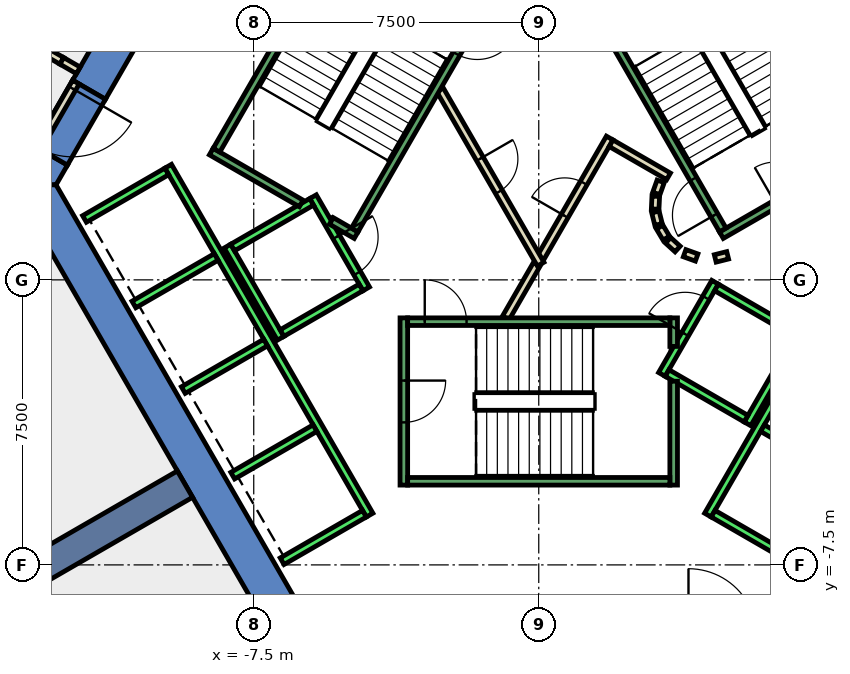
"""IFC4 building model, lengths in metres.
Left out: names, types, materials, properties, quantities, classifications, styles, units other than length and angle.
Written with IfcOpenShell. Run it as: python <this file> out.ifc"""

import sys

from ifc_helpers import new_model, si_unit, direction, frame, frame_2d, origin, place, context, subcontext, project, spatial, polyline, rectangle, outline, extrude, element, fill, save


model = new_model("IFC4")
c1 = context("Model", 3, precision=1e-05, world=origin(), true_north=direction((0.0, 1.0)))
c2 = subcontext(c1, "Body", "Model", "MODEL_VIEW")
j1 = project(units=[si_unit("LENGTHUNIT", "METRE"), si_unit("PLANEANGLEUNIT", "RADIAN")], contexts=[c1])
p1 = place(None, origin())
s1 = spatial("IfcSite", under=j1, at=p1, CompositionType="ELEMENT")
p2 = place(p1, origin())
s2 = spatial("IfcBuilding", under=s1, at=p2, CompositionType="ELEMENT")
p3 = place(p2, frame((0.0, 0.0, 176.0)))
s3 = spatial("IfcBuildingStorey", under=s2, at=p3, CompositionType="ELEMENT", Elevation=176.0)
p4 = place(p3, frame((0.0, 0.0, -0.4)))
e1 = element("IfcWall", 1, at=p4, inside=s3, PredefinedType="SHEAR", context=c2, shape_type="SweptSolid", body=[
    extrude(outline(polyline([(-12.267, 5.252), (-11.402, 4.752), (-6.351, 13.5), (-6.928, 14.5), (-12.267, 5.252)])), origin(), (0.0, 0.0, 1.0), 4.2),
])
p5 = place(p3, frame((0.0, 0.0, -0.4)))
e2 = element("IfcWall", 2, at=p5, inside=s3, PredefinedType="SHEAR", context=c2, shape_type="SweptSolid", body=[
    extrude(outline(polyline([(-12.402, 3.02), (-13.267, 3.52), (-13.856, 2.5), (-12.702, 2.5), (-12.402, 3.02)])), origin(), (0.0, 0.0, 1.0), 4.2),
])
p6 = place(p3, frame((0.0, 0.0, 3.6)))
e3 = element("IfcWall", 3, at=p6, inside=s3, PredefinedType="SHEAR", context=c2, shape_type="SweptSolid", body=[
    extrude(outline(polyline([(-13.267, 3.52), (-12.402, 3.02), (-11.402, 4.752), (-12.267, 5.252), (-13.267, 3.52)])), origin(), (0.0, 0.0, 1.0), 0.2),
])
p7 = place(p3, frame((0.0, 0.0, -0.4)))
e4 = element("IfcWall", 4, at=p7, inside=s3, PredefinedType="SHEAR", context=c2, shape_type="SweptSolid", body=[
    extrude(outline(polyline([(-13.856, 2.5), (-6.928, -9.5), (-6.351, -8.5), (-12.702, 2.5), (-13.856, 2.5)])), origin(), (0.0, 0.0, 1.0), 4.2),
])
p8 = place(p3, frame((-9.31, -5.375, -0.4), z_axis=(0.0, 0.0, 1.0), x_axis=(-0.866017533419, -0.500013631625, 0.0)))
e5 = element("IfcWall", 5, at=p8, inside=s3, PredefinedType="SHEAR", context=c2, shape_type="SweptSolid", body=[
    extrude(rectangle(XDim=9.0, YDim=0.8, at=frame_2d((4.5, 0.0))), origin(), (0.0, 0.0, 1.0), 4.2),
])
p9 = place(p3, frame((-14.966, 7.157, 0.0), z_axis=(0.0, 0.0, 1.0), x_axis=(0.86600487494, -0.500035555316, 0.0)))
e6 = element("IfcWall", 6, at=p9, inside=s3, PredefinedType="PARTITIONING", context=c2, shape_type="SweptSolid", body=[
    extrude(rectangle(XDim=2.79, YDim=0.2, at=frame_2d((1.395, 0.0))), origin(), (0.0, 0.0, 1.0), 3.75),
])
p10 = place(p3, frame((-0.866, -1.0, 0.0), z_axis=(0.0, 0.0, 1.0), x_axis=(0.500033287521, 0.866006184372, 0.0)))
e7 = element("IfcWall", 7, at=p10, inside=s3, PredefinedType="PARTITIONING", context=c2, shape_type="SweptSolid", body=[
    extrude(rectangle(XDim=1.632, YDim=0.2, at=frame_2d((0.816, 0.0))), origin(), (0.0, 0.0, 1.0), 3.75),
])
p11 = place(p3, frame((0.05, 0.587, 0.0), z_axis=(0.0, 0.0, 1.0), x_axis=(0.500028932171, 0.866008699143, 0.0)))
e8 = element("IfcWall", 8, at=p11, inside=s3, PredefinedType="PARTITIONING", context=c2, shape_type="SweptSolid", body=[
    extrude(rectangle(XDim=3.632, YDim=0.2, at=frame_2d((1.816, 0.0))), origin(), (0.0, 0.0, 1.0), 3.75),
])
p12 = place(p11, frame((1.266, 0.0, 0.0)))
e9 = element("IfcOpeningElement", 9, at=p12, cuts=e8, PredefinedType="OPENING", context=c2, shape_type="SweptSolid", body=[
    extrude(rectangle(XDim=1.0, YDim=2.1, at=frame_2d((0.5, 1.05))), frame((0.0, 0.11, 0.0), z_axis=(0.0, -1.0, 0.0), x_axis=(1.0, 0.0, 0.0)), (0.0, 0.0, 1.0), 0.22),
])
p13 = place(p3, frame((1.903, 3.595, 0.0), z_axis=(0.0, 0.0, 1.0), x_axis=(0.866239139897, -0.499629615326, 0.0)))
e10 = element("IfcWall", 10, at=p13, inside=s3, PredefinedType="PARTITIONING", context=c2, shape_type="SweptSolid", body=[
    extrude(rectangle(XDim=1.745, YDim=0.2, at=frame_2d((0.873, 0.0))), origin(), (0.0, 0.0, 1.0), 3.75),
])
p14 = place(p3, frame((3.208, 2.592, 0.0), z_axis=(0.0, 0.0, 1.0), x_axis=(-0.337388820924, -0.941365382578, 0.0)))
e11 = element("IfcWall", 11, at=p14, inside=s3, PredefinedType="PARTITIONING", context=c2, shape_type="SweptSolid", body=[
    extrude(rectangle(XDim=0.338, YDim=0.2, at=frame_2d((0.169, 0.0))), origin(), (0.0, 0.0, 1.0), 3.75),
])
p15 = place(p3, frame((3.079, 2.199, 0.0), z_axis=(0.0, 0.0, 1.0), x_axis=(-0.047771483479, -0.998858290933, 0.0)))
e12 = element("IfcWall", 12, at=p15, inside=s3, PredefinedType="PARTITIONING", context=c2, shape_type="SweptSolid", body=[
    extrude(rectangle(XDim=0.337, YDim=0.2, at=frame_2d((0.169, 0.0))), origin(), (0.0, 0.0, 1.0), 3.75),
])
p16 = place(p3, frame((3.07, 1.786, 0.0), z_axis=(0.0, 0.0, 1.0), x_axis=(0.242705583207, -0.970099994784, 0.0)))
e13 = element("IfcWall", 13, at=p16, inside=s3, PredefinedType="PARTITIONING", context=c2, shape_type="SweptSolid", body=[
    extrude(rectangle(XDim=0.338, YDim=0.2, at=frame_2d((0.169, 0.0))), origin(), (0.0, 0.0, 1.0), 3.75),
])
for number, where, z_axis, x_axis in (
    (14, (3.182, 1.388, 0.0), (0.0, 0.0, 1.0), (0.512, -0.859, 0.0)),
    (15, (3.404, 1.039, 0.0), (0.0, 0.0, 1.0), (0.74, -0.672, 0.0)),
):
    element("IfcWall", number, at=place(p3, frame(where, z_axis=z_axis, x_axis=x_axis)), inside=s3, PredefinedType="PARTITIONING", context=c2, shape_type="SweptSolid", body=[
        extrude(rectangle(XDim=0.338, YDim=0.2, at=frame_2d((0.169, 0.0))), origin(), (0.0, 0.0, 1.0), 3.75),
    ])
p17 = place(p3, frame((3.838, 0.702, 0.0), z_axis=(0.0, 0.0, 1.0), x_axis=(0.941035081519, -0.338308993895, 0.0)))
e16 = element("IfcWall", 16, at=p17, inside=s3, PredefinedType="PARTITIONING", context=c2, shape_type="SweptSolid", body=[
    extrude(rectangle(XDim=0.337, YDim=0.2, at=frame_2d((0.168, 0.0))), origin(), (0.0, 0.0, 1.0), 3.75),
])
p18 = place(p3, frame((4.644, 0.564, 0.0), z_axis=(0.0, 0.0, 1.0), x_axis=(0.969929076366, 0.243387729394, 0.0)))
e17 = element("IfcWall", 17, at=p18, inside=s3, PredefinedType="PARTITIONING", context=c2, shape_type="SweptSolid", body=[
    extrude(rectangle(XDim=0.337, YDim=0.2, at=frame_2d((0.168, 0.0))), origin(), (0.0, 0.0, 1.0), 3.75),
])
p19 = place(p3, frame((-2.598, 5.0, 0.0), z_axis=(0.0, 0.0, 1.0), x_axis=(0.49995654735, -0.86605048973, 0.0)))
e18 = element("IfcWall", 18, at=p19, inside=s3, PredefinedType="PARTITIONING", context=c2, shape_type="SweptSolid", body=[
    extrude(rectangle(XDim=5.296, YDim=0.2, at=frame_2d((2.648, 0.0))), origin(), (0.0, 0.0, 1.0), 3.75),
])
p20 = place(p19, frame((2.098, 0.0, 0.0)))
e19 = element("IfcOpeningElement", 19, at=p20, cuts=e18, PredefinedType="OPENING", context=c2, shape_type="SweptSolid", body=[
    extrude(rectangle(XDim=1.0, YDim=2.1, at=frame_2d((0.5, 1.05))), frame((0.0, 0.11, 0.0), z_axis=(0.0, -1.0, 0.0), x_axis=(1.0, 0.0, 0.0)), (0.0, 0.0, 1.0), 0.22),
])
p21 = place(p3, frame((-12.18, 5.202, 0.0), z_axis=(0.0, 0.0, 1.0), x_axis=(-0.50002537861, -0.866010750942, 0.0)))
e20 = element("IfcWall", 20, at=p21, inside=s3, PredefinedType="PARTITIONING", context=c2, shape_type="SweptSolid", body=[
    extrude(rectangle(XDim=2.0, YDim=0.2, at=frame_2d((1.0, 0.0))), origin(), (0.0, 0.0, 1.0), 2.4),
])
p22 = place(p21, frame((0.19, 0.0, 0.0)))
e21 = element("IfcOpeningElement", 21, at=p22, cuts=e20, PredefinedType="OPENING", context=c2, shape_type="SweptSolid", body=[
    extrude(rectangle(XDim=1.8, YDim=2.1, at=frame_2d((0.9, 1.05))), frame((0.0, 0.11, 0.0), z_axis=(0.0, -1.0, 0.0), x_axis=(1.0, 0.0, 0.0)), (0.0, 0.0, 1.0), 0.22),
])
p23 = place(p3, frame((-12.55, 5.762, 0.0), z_axis=(0.0, 0.0, 1.0), x_axis=(0.866071776036, -0.499919672301, 0.0)))
e22 = element("IfcWall", 22, at=p23, inside=s3, PredefinedType="PARTITIONING", context=c2, shape_type="SweptSolid", body=[
    extrude(rectangle(XDim=0.5, YDim=0.2, at=frame_2d((0.25, 0.0))), origin(), (0.0, 0.0, 1.0), 2.4),
])
p24 = place(p3, frame((-5.94, 2.188, 0.0), z_axis=(0.0, 0.0, 1.0), x_axis=(0.49994636267, -0.866056369097, 0.0)))
e23 = element("IfcWall", 23, at=p24, inside=s3, PredefinedType="STANDARD", context=c2, shape_type="SweptSolid", body=[
    extrude(rectangle(XDim=2.8, YDim=0.2, at=frame_2d((1.4, 0.0))), origin(), (0.0, 0.0, 1.0), 3.75),
])
p25 = place(p24, frame((1.225, 0.0, 0.0)))
e24 = element("IfcOpeningElement", 24, at=p25, cuts=e23, PredefinedType="OPENING", context=c2, shape_type="SweptSolid", body=[
    extrude(rectangle(XDim=1.1, YDim=2.1, at=frame_2d((0.55, 1.05))), frame((0.0, 0.11, 0.0), z_axis=(0.0, -1.0, 0.0), x_axis=(1.0, 0.0, 0.0)), (0.0, 0.0, 1.0), 0.22),
])
p26 = place(p3, frame((-8.192, 0.888, 0.0), z_axis=(0.0, 0.0, 1.0), x_axis=(0.49994636267, -0.866056369097, 0.0)))
e25 = element("IfcWall", 25, at=p26, inside=s3, PredefinedType="STANDARD", context=c2, shape_type="SweptSolid", body=[
    extrude(rectangle(XDim=2.8, YDim=0.2, at=frame_2d((1.4, 0.0))), origin(), (0.0, 0.0, 1.0), 3.75),
])
for number, where, z_axis, x_axis in (
    (26, (-5.977, 2.052, 0.0), (0.0, 0.0, 1.0), (-0.866, -0.5, 0.0)),
    (27, (-4.677, -0.2, 0.0), (0.0, 0.0, 1.0), (-0.866, -0.5, 0.0)),
):
    element("IfcWall", number, at=place(p3, frame(where, z_axis=z_axis, x_axis=x_axis)), inside=s3, PredefinedType="STANDARD", context=c2, shape_type="SweptSolid", body=[
        extrude(rectangle(XDim=2.399, YDim=0.2, at=frame_2d((1.2, 0.0))), origin(), (0.0, 0.0, 1.0), 3.75),
    ])
p27 = place(p3, frame((-9.751, 2.99, 0.0), z_axis=(0.0, 0.0, 1.0), x_axis=(0.50000090737, -0.866024879913, 0.0)))
e28 = element("IfcWall", 28, at=p27, inside=s3, PredefinedType="STANDARD", context=c2, shape_type="SweptSolid", body=[
    extrude(rectangle(XDim=10.6, YDim=0.2, at=frame_2d((5.3, 0.0))), origin(), (0.0, 0.0, 1.0), 3.75),
])
p28 = place(p3, frame((-9.788, 2.853, 0.0), z_axis=(0.0, 0.0, 1.0), x_axis=(-0.865998541277, -0.500046524342, 0.0)))
e29 = element("IfcWall", 29, at=p28, inside=s3, PredefinedType="STANDARD", context=c2, shape_type="SweptSolid", body=[
    extrude(rectangle(XDim=2.5, YDim=0.2, at=frame_2d((1.25, 0.0))), origin(), (0.0, 0.0, 1.0), 3.75),
])
for number, where, z_axis, x_axis in (
    (30, (-8.488, 0.602, 0.0), (0.0, 0.0, 1.0), (-0.866, -0.5, 0.0)),
    (31, (-7.188, -1.65, 0.0), (0.0, 0.0, 1.0), (-0.866, -0.5, 0.0)),
    (32, (-5.888, -3.902, 0.0), (0.0, 0.0, 1.0), (-0.866, -0.5, 0.0)),
    (33, (-4.588, -6.153, 0.0), (0.0, 0.0, 1.0), (-0.866, -0.5, 0.0)),
):
    element("IfcWall", number, at=place(p3, frame(where, z_axis=z_axis, x_axis=x_axis)), inside=s3, PredefinedType="STANDARD", context=c2, shape_type="SweptSolid", body=[
        extrude(rectangle(XDim=2.5, YDim=0.2, at=frame_2d((1.25, 0.0))), origin(), (0.0, 0.0, 1.0), 3.75),
    ])
p29 = place(p3, frame((3.24, -2.488, 0.0), z_axis=(0.0, 0.0, 1.0), x_axis=(0.49994636267, 0.866056369097, 0.0)))
e34 = element("IfcWall", 34, at=p29, inside=s3, PredefinedType="STANDARD", context=c2, shape_type="SweptSolid", body=[
    extrude(rectangle(XDim=2.8, YDim=0.2, at=frame_2d((1.4, 0.0))), origin(), (0.0, 0.0, 1.0), 3.75),
])
p30 = place(p29, frame((1.225, 0.0, 0.0)))
e35 = element("IfcOpeningElement", 35, at=p30, cuts=e34, PredefinedType="OPENING", context=c2, shape_type="SweptSolid", body=[
    extrude(rectangle(XDim=1.1, YDim=2.1, at=frame_2d((0.55, 1.05))), frame((0.0, 0.11, 0.0), z_axis=(0.0, -1.0, 0.0), x_axis=(1.0, 0.0, 0.0)), (0.0, 0.0, 1.0), 0.22),
])
p31 = place(p3, frame((5.492, -3.788, 0.0), z_axis=(0.0, 0.0, 1.0), x_axis=(0.500011755427, 0.866018616679, 0.0)))
e36 = element("IfcWall", 36, at=p31, inside=s3, PredefinedType="STANDARD", context=c2, shape_type="SweptSolid", body=[
    extrude(rectangle(XDim=2.8, YDim=0.2, at=frame_2d((1.4, 0.0))), origin(), (0.0, 0.0, 1.0), 3.75),
])
p32 = place(p3, frame((3.377, -2.452, 0.0), z_axis=(0.0, 0.0, 1.0), x_axis=(0.865955154139, -0.50012165622, 0.0)))
e37 = element("IfcWall", 37, at=p32, inside=s3, PredefinedType="STANDARD", context=c2, shape_type="SweptSolid", body=[
    extrude(rectangle(XDim=2.4, YDim=0.2, at=frame_2d((1.2, 0.0))), origin(), (0.0, 0.0, 1.0), 3.75),
])
p33 = place(p3, frame((4.677, -0.2, 0.0), z_axis=(0.0, 0.0, 1.0), x_axis=(0.865973769406, -0.500089422704, 0.0)))
e38 = element("IfcWall", 38, at=p33, inside=s3, PredefinedType="STANDARD", context=c2, shape_type="SweptSolid", body=[
    extrude(rectangle(XDim=2.399, YDim=0.2, at=frame_2d((1.2, 0.0))), origin(), (0.0, 0.0, 1.0), 3.75),
])
p34 = place(p3, frame((4.451, -6.19, 0.0), z_axis=(0.0, 0.0, 1.0), x_axis=(0.50000090737, 0.866024879913, 0.0)))
e39 = element("IfcWall", 39, at=p34, inside=s3, PredefinedType="STANDARD", context=c2, shape_type="SweptSolid", body=[
    extrude(rectangle(XDim=10.6, YDim=0.2, at=frame_2d((5.3, 0.0))), origin(), (0.0, 0.0, 1.0), 3.75),
])
for number, where, z_axis, x_axis in (
    (40, (4.588, -6.153, 0.0), (0.0, 0.0, 1.0), (0.866, -0.5, 0.0)),
    (41, (5.888, -3.902, 0.0), (0.0, 0.0, 1.0), (0.866, -0.5, 0.0)),
):
    element("IfcWall", number, at=place(p3, frame(where, z_axis=z_axis, x_axis=x_axis)), inside=s3, PredefinedType="STANDARD", context=c2, shape_type="SweptSolid", body=[
        extrude(rectangle(XDim=2.5, YDim=0.2, at=frame_2d((1.25, 0.0))), origin(), (0.0, 0.0, 1.0), 3.75),
    ])
p35 = place(p3, frame((-3.55, -1.0, 0.0), z_axis=(0.0, 0.0, 1.0), x_axis=(0.0, -1.0, 0.0)))
e42 = element("IfcWall", 42, at=p35, inside=s3, PredefinedType="STANDARD", context=c2, shape_type="SweptSolid", body=[
    extrude(rectangle(XDim=4.4, YDim=0.2, at=frame_2d((2.2, 0.0))), origin(), (0.0, 0.0, 1.0), 3.75),
])
p36 = place(p35, frame((1.65, 0.0, 0.0)))
e43 = element("IfcOpeningElement", 43, at=p36, cuts=e42, PredefinedType="OPENING", context=c2, shape_type="SweptSolid", body=[
    extrude(rectangle(XDim=1.1, YDim=2.2, at=frame_2d((0.55, 1.1))), frame((0.0, 0.11, 0.0), z_axis=(0.0, -1.0, 0.0), x_axis=(1.0, 0.0, 0.0)), (0.0, 0.0, 1.0), 0.22),
])
p37 = place(p3, frame((3.55, -2.667, 0.0), z_axis=(0.0, 0.0, 1.0), x_axis=(0.0, -1.0, 0.0)))
e44 = element("IfcWall", 44, at=p37, inside=s3, PredefinedType="STANDARD", context=c2, shape_type="SweptSolid", body=[
    extrude(rectangle(XDim=2.733, YDim=0.2, at=frame_2d((1.366, 0.0))), origin(), (0.0, 0.0, 1.0), 3.75),
])
p38 = place(p3, frame((3.55, -1.0, 0.0), z_axis=(0.0, 0.0, 1.0), x_axis=(0.0, -1.0, 0.0)))
e45 = element("IfcWall", 45, at=p38, inside=s3, PredefinedType="STANDARD", context=c2, shape_type="SweptSolid", body=[
    extrude(rectangle(XDim=0.751, YDim=0.2, at=frame_2d((0.375, 0.0))), origin(), (0.0, 0.0, 1.0), 3.75),
])
p39 = place(p3, frame((-3.45, -1.1, 0.0), z_axis=(0.0, 0.0, 1.0), x_axis=(1.0, 0.0, 0.0)))
e46 = element("IfcWall", 46, at=p39, inside=s3, PredefinedType="STANDARD", context=c2, shape_type="SweptSolid", body=[
    extrude(rectangle(XDim=6.9, YDim=0.2, at=frame_2d((3.45, 0.0))), origin(), (0.0, 0.0, 1.0), 3.75),
])
p40 = place(p39, frame((0.45, 0.0, 0.0)))
e47 = element("IfcOpeningElement", 47, at=p40, cuts=e46, PredefinedType="OPENING", context=c2, shape_type="SweptSolid", body=[
    extrude(rectangle(XDim=1.1, YDim=2.2, at=frame_2d((0.55, 1.1))), frame((0.0, 0.11, 0.0), z_axis=(0.0, -1.0, 0.0), x_axis=(1.0, 0.0, 0.0)), (0.0, 0.0, 1.0), 0.22),
])
p41 = place(p3, frame((-3.45, -5.3, 0.0), z_axis=(0.0, 0.0, 1.0), x_axis=(1.0, 0.0, 0.0)))
e48 = element("IfcWall", 48, at=p41, inside=s3, PredefinedType="STANDARD", context=c2, shape_type="SweptSolid", body=[
    extrude(rectangle(XDim=6.9, YDim=0.2, at=frame_2d((3.45, 0.0))), origin(), (0.0, 0.0, 1.0), 3.75),
])
p42 = place(p3, frame((4.806, 1.176, 0.0), z_axis=(0.0, 0.0, 1.0), x_axis=(0.866059941101, 0.499940174841, 0.0)))
e49 = element("IfcWall", 49, at=p42, inside=s3, PredefinedType="STANDARD", context=c2, shape_type="SweptSolid", body=[
    extrude(rectangle(XDim=4.4, YDim=0.2, at=frame_2d((2.2, 0.0))), origin(), (0.0, 0.0, 1.0), 3.75),
])
p43 = place(p42, frame((1.65, 0.0, 0.0)))
e50 = element("IfcOpeningElement", 50, at=p43, cuts=e49, PredefinedType="OPENING", context=c2, shape_type="SweptSolid", body=[
    extrude(rectangle(XDim=1.1, YDim=2.2, at=frame_2d((0.55, 1.1))), frame((0.0, 0.11, 0.0), z_axis=(0.0, -1.0, 0.0), x_axis=(1.0, 0.0, 0.0)), (0.0, 0.0, 1.0), 0.22),
])
p44 = place(p3, frame((4.843, 1.312, 0.0), z_axis=(0.0, 0.0, 1.0), x_axis=(-0.499963383562, 0.866046543262, 0.0)))
e51 = element("IfcWall", 51, at=p44, inside=s3, PredefinedType="STANDARD", context=c2, shape_type="SweptSolid", body=[
    extrude(rectangle(XDim=6.9, YDim=0.2, at=frame_2d((3.45, 0.0))), origin(), (0.0, 0.0, 1.0), 3.75),
])
p45 = place(p44, frame((0.45, 0.0, 0.0)))
e52 = element("IfcOpeningElement", 52, at=p45, cuts=e51, PredefinedType="OPENING", context=c2, shape_type="SweptSolid", body=[
    extrude(rectangle(XDim=1.1, YDim=2.2, at=frame_2d((0.55, 1.1))), frame((0.0, 0.11, 0.0), z_axis=(0.0, -1.0, 0.0), x_axis=(1.0, 0.0, 0.0)), (0.0, 0.0, 1.0), 0.22),
])
p46 = place(p3, frame((8.48, 3.412, 0.0), z_axis=(0.0, 0.0, 1.0), x_axis=(-0.499978703459, 0.866037698999, 0.0)))
e53 = element("IfcWall", 53, at=p46, inside=s3, PredefinedType="STANDARD", context=c2, shape_type="SweptSolid", body=[
    extrude(rectangle(XDim=6.9, YDim=0.2, at=frame_2d((3.45, 0.0))), origin(), (0.0, 0.0, 1.0), 3.75),
])
p47 = place(p3, frame((-6.25, 2.01, 0.0), z_axis=(0.0, 0.0, 1.0), x_axis=(-0.86611865017, 0.499838457731, 0.0)))
e54 = element("IfcWall", 54, at=p47, inside=s3, PredefinedType="STANDARD", context=c2, shape_type="SweptSolid", body=[
    extrude(rectangle(XDim=2.733, YDim=0.2, at=frame_2d((1.366, 0.0))), origin(), (0.0, 0.0, 1.0), 3.75),
])
p48 = place(p3, frame((-4.806, 1.176, 0.0), z_axis=(0.0, 0.0, 1.0), x_axis=(-0.866558586415, 0.499075361355, 0.0)))
e55 = element("IfcWall", 55, at=p48, inside=s3, PredefinedType="STANDARD", context=c2, shape_type="SweptSolid", body=[
    extrude(rectangle(XDim=0.751, YDim=0.2, at=frame_2d((0.376, 0.0))), origin(), (0.0, 0.0, 1.0), 3.75),
])
p49 = place(p3, frame((-1.393, 7.288, 0.0), z_axis=(0.0, 0.0, 1.0), x_axis=(-0.499963383562, -0.866046543262, 0.0)))
e56 = element("IfcWall", 56, at=p49, inside=s3, PredefinedType="STANDARD", context=c2, shape_type="SweptSolid", body=[
    extrude(rectangle(XDim=6.9, YDim=0.2, at=frame_2d((3.45, 0.0))), origin(), (0.0, 0.0, 1.0), 3.75),
])
p50 = place(p49, frame((0.45, 0.0, 0.0)))
e57 = element("IfcOpeningElement", 57, at=p50, cuts=e56, PredefinedType="OPENING", context=c2, shape_type="SweptSolid", body=[
    extrude(rectangle(XDim=1.1, YDim=2.2, at=frame_2d((0.55, 1.1))), frame((0.0, 0.11, 0.0), z_axis=(0.0, -1.0, 0.0), x_axis=(1.0, 0.0, 0.0)), (0.0, 0.0, 1.0), 0.22),
])
p51 = place(p3, frame((-5.03, 9.388, 0.0), z_axis=(0.0, 0.0, 1.0), x_axis=(-0.499978703459, -0.866037698999, 0.0)))
e58 = element("IfcWall", 58, at=p51, inside=s3, PredefinedType="STANDARD", context=c2, shape_type="SweptSolid", body=[
    extrude(rectangle(XDim=6.9, YDim=0.2, at=frame_2d((3.45, 0.0))), origin(), (0.0, 0.0, 1.0), 3.75),
])
p52 = place(p12, origin())
e59 = element("IfcDoor", 59, at=p52, inside=s3, OperationType="SINGLE_SWING_RIGHT", PredefinedType="DOOR", context=c2, shape_type="SweptSolid", body=[
    extrude(rectangle(XDim=1.0, YDim=2.1, at=frame_2d((0.5, 1.05))), frame((0.0, 0.025, 0.0), z_axis=(0.0, -1.0, 0.0), x_axis=(1.0, 0.0, 0.0)), (0.0, 0.0, 1.0), 0.05),
])
fill(e9, e59)
p53 = place(p20, origin())
e60 = element("IfcDoor", 60, at=p53, inside=s3, OperationType="SINGLE_SWING_RIGHT", PredefinedType="DOOR", context=c2, shape_type="SweptSolid", body=[
    extrude(rectangle(XDim=1.0, YDim=2.1, at=frame_2d((0.5, 1.05))), frame((0.0, 0.025, 0.0), z_axis=(0.0, -1.0, 0.0), x_axis=(1.0, 0.0, 0.0)), (0.0, 0.0, 1.0), 0.05),
])
fill(e19, e60)
p54 = place(p22, origin())
e61 = element("IfcDoor", 61, at=p54, inside=s3, OperationType="DOUBLE_DOOR_SINGLE_SWING", PredefinedType="DOOR", context=c2, shape_type="SweptSolid", body=[
    extrude(rectangle(XDim=1.8, YDim=2.1, at=frame_2d((0.9, 1.05))), frame((0.0, 0.025, 0.0), z_axis=(0.0, -1.0, 0.0), x_axis=(1.0, 0.0, 0.0)), (0.0, 0.0, 1.0), 0.05),
])
fill(e21, e61)
p55 = place(p30, origin())
e62 = element("IfcDoor", 62, at=p55, inside=s3, OperationType="SLIDING_TO_LEFT", PredefinedType="DOOR", context=c2, shape_type="SweptSolid", body=[
    extrude(rectangle(XDim=1.1, YDim=2.1, at=frame_2d((0.55, 1.05))), frame((0.0, 0.025, 0.0), z_axis=(0.0, -1.0, 0.0), x_axis=(1.0, 0.0, 0.0)), (0.0, 0.0, 1.0), 0.05),
])
fill(e35, e62)
p56 = place(p25, origin())
e63 = element("IfcDoor", 63, at=p56, inside=s3, OperationType="SLIDING_TO_LEFT", PredefinedType="DOOR", context=c2, shape_type="SweptSolid", body=[
    extrude(rectangle(XDim=1.1, YDim=2.1, at=frame_2d((0.55, 1.05))), frame((0.0, 0.025, 0.0), z_axis=(0.0, -1.0, 0.0), x_axis=(1.0, 0.0, 0.0)), (0.0, 0.0, 1.0), 0.05),
])
fill(e24, e63)
p57 = place(p40, origin())
e64 = element("IfcDoor", 64, at=p57, inside=s3, OperationType="SINGLE_SWING_LEFT", PredefinedType="DOOR", context=c2, shape_type="SweptSolid", body=[
    extrude(rectangle(XDim=1.1, YDim=2.2, at=frame_2d((0.55, 1.1))), frame((0.0, 0.025, 0.0), z_axis=(0.0, -1.0, 0.0), x_axis=(1.0, 0.0, 0.0)), (0.0, 0.0, 1.0), 0.05),
])
fill(e47, e64)
p58 = place(p36, origin())
e65 = element("IfcDoor", 65, at=p58, inside=s3, OperationType="SINGLE_SWING_LEFT", PredefinedType="DOOR", context=c2, shape_type="SweptSolid", body=[
    extrude(rectangle(XDim=1.1, YDim=2.2, at=frame_2d((0.55, 1.1))), frame((0.0, 0.025, 0.0), z_axis=(0.0, -1.0, 0.0), x_axis=(1.0, 0.0, 0.0)), (0.0, 0.0, 1.0), 0.05),
])
fill(e43, e65)
p59 = place(p45, origin())
e66 = element("IfcDoor", 66, at=p59, inside=s3, OperationType="SINGLE_SWING_LEFT", PredefinedType="DOOR", context=c2, shape_type="SweptSolid", body=[
    extrude(rectangle(XDim=1.1, YDim=2.2, at=frame_2d((0.55, 1.1))), frame((0.0, 0.025, 0.0), z_axis=(0.0, -1.0, 0.0), x_axis=(1.0, 0.0, 0.0)), (0.0, 0.0, 1.0), 0.05),
])
fill(e52, e66)
p60 = place(p50, origin())
e67 = element("IfcDoor", 67, at=p60, inside=s3, OperationType="SINGLE_SWING_LEFT", PredefinedType="DOOR", context=c2, shape_type="SweptSolid", body=[
    extrude(rectangle(XDim=1.1, YDim=2.2, at=frame_2d((0.55, 1.1))), frame((0.0, 0.025, 0.0), z_axis=(0.0, -1.0, 0.0), x_axis=(1.0, 0.0, 0.0)), (0.0, 0.0, 1.0), 0.05),
])
fill(e57, e67)
save(model, sys.argv[1])
